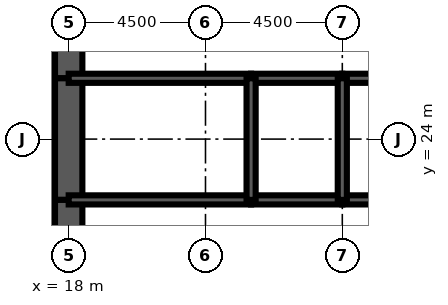
"""IFC4 building model, lengths in metres.
Left out: names, types, materials, properties, quantities, classifications, styles, units other than length and angle.
Written with IfcOpenShell. Run it as: python <this file> out.ifc"""

import sys

from ifc_helpers import new_model, si_unit, direction, frame, frame_2d, origin, place, context, subcontext, project, spatial, rectangle, extrude, element, fill, save


model = new_model("IFC4")
c1 = context("Model", 3, precision=1e-05, world=origin(), true_north=direction((0.0, 1.0)))
c2 = subcontext(c1, "Body", "Model", "MODEL_VIEW")
j1 = project(units=[si_unit("LENGTHUNIT", "METRE"), si_unit("PLANEANGLEUNIT", "RADIAN")], contexts=[c1])
p1 = place(None, origin())
s1 = spatial("IfcSite", under=j1, at=p1, CompositionType="ELEMENT")
p2 = place(p1, origin())
s2 = spatial("IfcBuilding", under=s1, at=p2, CompositionType="ELEMENT")
p3 = place(p2, frame((0.0, 0.0, 163.5)))
s3 = spatial("IfcBuildingStorey", under=s2, at=p3, CompositionType="ELEMENT", Elevation=163.5)
p4 = place(p3, frame((18.0, 28.8, 0.0), z_axis=(0.0, 0.0, 1.0), x_axis=(0.0, -1.0, 0.0)))
e1 = element("IfcWall", 1, at=p4, inside=s3, PredefinedType="SHEAR", context=c2, shape_type="SweptSolid", body=[
    extrude(rectangle(XDim=2.8, YDim=0.9, at=frame_2d((1.4, 0.0))), origin(), (0.0, 0.0, 1.0), 4.2),
])
p5 = place(p4, frame((0.4, 0.0, 0.0)))
e2 = element("IfcOpeningElement", 2, at=p5, cuts=e1, PredefinedType="OPENING", context=c2, shape_type="SweptSolid", body=[
    extrude(rectangle(XDim=1.8, YDim=2.1, at=frame_2d((0.9, 1.05))), frame((0.0, 0.46, 0.0), z_axis=(0.0, -1.0, 0.0), x_axis=(1.0, 0.0, 0.0)), (0.0, 0.0, 1.0), 0.92),
])
p6 = place(p3, frame((18.0, 26.0, 0.0), z_axis=(0.0, 0.0, 1.0), x_axis=(0.0, -1.0, 0.0)))
e3 = element("IfcWall", 3, at=p6, inside=s3, PredefinedType="SHEAR", context=c2, shape_type="SweptSolid", body=[
    extrude(rectangle(XDim=4.0, YDim=0.9, at=frame_2d((2.0, 0.0))), origin(), (0.0, 0.0, 1.0), 4.2),
])
p7 = place(p3, frame((18.0, 22.0, 0.0), z_axis=(0.0, 0.0, 1.0), x_axis=(0.0, -1.0, 0.0)))
e4 = element("IfcWall", 4, at=p7, inside=s3, PredefinedType="SHEAR", context=c2, shape_type="SweptSolid", body=[
    extrude(rectangle(XDim=2.8, YDim=0.9, at=frame_2d((1.4, 0.0))), origin(), (0.0, 0.0, 1.0), 4.2),
])
p8 = place(p7, frame((0.6, 0.0, 0.0)))
e5 = element("IfcOpeningElement", 5, at=p8, cuts=e4, PredefinedType="OPENING", context=c2, shape_type="SweptSolid", body=[
    extrude(rectangle(XDim=1.8, YDim=2.1, at=frame_2d((0.9, 1.05))), frame((0.0, 0.46, 0.0), z_axis=(0.0, -1.0, 0.0), x_axis=(1.0, 0.0, 0.0)), (0.0, 0.0, 1.0), 0.92),
])
p9 = place(p3, frame((18.0, 22.0, 0.0), z_axis=(0.0, 0.0, 1.0), x_axis=(1.0, 0.0, 0.0)))
e6 = element("IfcWall", 6, at=p9, inside=s3, PredefinedType="SOLIDWALL", context=c2, shape_type="SweptSolid", body=[
    extrude(rectangle(XDim=6.0, YDim=0.3, at=frame_2d((3.0, 0.0))), origin(), (0.0, 0.0, 1.0), 4.2),
])
p10 = place(p9, frame((4.4, 0.0, 0.0)))
e7 = element("IfcOpeningElement", 7, at=p10, cuts=e6, PredefinedType="OPENING", context=c2, shape_type="SweptSolid", body=[
    extrude(rectangle(XDim=1.0, YDim=2.1, at=frame_2d((0.5, 1.05))), frame((0.0, 0.16, 0.0), z_axis=(0.0, -1.0, 0.0), x_axis=(1.0, 0.0, 0.0)), (0.0, 0.0, 1.0), 0.32),
])
p11 = place(p9, frame((0.85, 0.0, 0.0)))
e8 = element("IfcOpeningElement", 8, at=p11, cuts=e6, PredefinedType="OPENING", context=c2, shape_type="SweptSolid", body=[
    extrude(rectangle(XDim=1.0, YDim=2.1, at=frame_2d((0.5, 1.05))), frame((0.0, 0.16, 0.0), z_axis=(0.0, -1.0, 0.0), x_axis=(1.0, 0.0, 0.0)), (0.0, 0.0, 1.0), 0.32),
])
p12 = place(p3, frame((24.0, 22.0, 0.0), z_axis=(0.0, 0.0, 1.0), x_axis=(1.0, 0.0, 0.0)))
e9 = element("IfcWall", 9, at=p12, inside=s3, PredefinedType="SOLIDWALL", context=c2, shape_type="SweptSolid", body=[
    extrude(rectangle(XDim=3.0, YDim=0.3, at=frame_2d((1.5, 0.0))), origin(), (0.0, 0.0, 1.0), 4.2),
])
p13 = place(p12, frame((1.0, 0.0, 0.0)))
e10 = element("IfcOpeningElement", 10, at=p13, cuts=e9, PredefinedType="OPENING", context=c2, shape_type="SweptSolid", body=[
    extrude(rectangle(XDim=1.0, YDim=2.1, at=frame_2d((0.5, 1.05))), frame((0.0, 0.16, 0.0), z_axis=(0.0, -1.0, 0.0), x_axis=(1.0, 0.0, 0.0)), (0.0, 0.0, 1.0), 0.32),
])
p14 = place(p3, frame((27.0, 22.0, 0.0), z_axis=(0.0, 0.0, 1.0), x_axis=(1.0, 0.0, 0.0)))
e11 = element("IfcWall", 11, at=p14, inside=s3, PredefinedType="SOLIDWALL", context=c2, shape_type="SweptSolid", body=[
    extrude(rectangle(XDim=9.0, YDim=0.3, at=frame_2d((4.5, 0.0))), origin(), (0.0, 0.0, 1.0), 4.2),
])
p15 = place(p14, frame((4.0, 0.0, 0.0)))
e12 = element("IfcOpeningElement", 12, at=p15, cuts=e11, PredefinedType="OPENING", context=c2, shape_type="SweptSolid", body=[
    extrude(rectangle(XDim=1.0, YDim=2.1, at=frame_2d((0.5, 1.05))), frame((0.0, 0.16, 0.0), z_axis=(0.0, -1.0, 0.0), x_axis=(1.0, 0.0, 0.0)), (0.0, 0.0, 1.0), 0.32),
])
p16 = place(p3, frame((18.0, 26.0, 0.0), z_axis=(0.0, 0.0, 1.0), x_axis=(1.0, 0.0, 0.0)))
e13 = element("IfcWall", 13, at=p16, inside=s3, PredefinedType="SOLIDWALL", context=c2, shape_type="SweptSolid", body=[
    extrude(rectangle(XDim=6.0, YDim=0.3, at=frame_2d((3.0, 0.0))), origin(), (0.0, 0.0, 1.0), 4.2),
])
p17 = place(p3, frame((24.0, 26.0, 0.0), z_axis=(0.0, 0.0, 1.0), x_axis=(1.0, 0.0, 0.0)))
e14 = element("IfcWall", 14, at=p17, inside=s3, PredefinedType="SOLIDWALL", context=c2, shape_type="SweptSolid", body=[
    extrude(rectangle(XDim=3.0, YDim=0.3, at=frame_2d((1.5, 0.0))), origin(), (0.0, 0.0, 1.0), 4.2),
])
p18 = place(p3, frame((27.0, 26.0, 0.0), z_axis=(0.0, 0.0, 1.0), x_axis=(1.0, 0.0, 0.0)))
e15 = element("IfcWall", 15, at=p18, inside=s3, PredefinedType="SOLIDWALL", context=c2, shape_type="SweptSolid", body=[
    extrude(rectangle(XDim=9.0, YDim=0.3, at=frame_2d((4.5, 0.0))), origin(), (0.0, 0.0, 1.0), 4.2),
])
for number, where, z_axis, x_axis in (
    (16, (24.0, 22.0, 0.0), (0.0, 0.0, 1.0), (0.0, 1.0, 0.0)),
    (17, (27.0, 22.0, 0.0), (0.0, 0.0, 1.0), (0.0, 1.0, 0.0)),
):
    element("IfcWall", number, at=place(p3, frame(where, z_axis=z_axis, x_axis=x_axis)), inside=s3, PredefinedType="SOLIDWALL", context=c2, shape_type="SweptSolid", body=[
        extrude(rectangle(XDim=4.0, YDim=0.3, at=frame_2d((2.0, 0.0))), origin(), (0.0, 0.0, 1.0), 4.2),
    ])
p19 = place(p3, frame((20.325, 22.15, 0.0), z_axis=(0.0, 0.0, 1.0), x_axis=(0.0, 1.0, 0.0)))
e18 = element("IfcWall", 18, at=p19, inside=s3, PredefinedType="PARTITIONING", context=c2, shape_type="SweptSolid", body=[
    extrude(rectangle(XDim=3.7, YDim=0.15, at=frame_2d((1.85, 0.0))), origin(), (0.0, 0.0, 1.0), 3.0),
])
p20 = place(p8, origin())
e19 = element("IfcDoor", 19, at=p20, inside=s3, OperationType="SINGLE_SWING_LEFT", PredefinedType="DOOR", context=c2, shape_type="SweptSolid", body=[
    extrude(rectangle(XDim=1.8, YDim=2.1, at=frame_2d((0.9, 1.05))), frame((0.0, 0.45, 0.0), z_axis=(0.0, -1.0, 0.0), x_axis=(1.0, 0.0, 0.0)), (0.0, 0.0, 1.0), 0.899),
])
fill(e5, e19)
p21 = place(p5, origin())
e20 = element("IfcDoor", 20, at=p21, inside=s3, OperationType="SINGLE_SWING_LEFT", PredefinedType="DOOR", context=c2, shape_type="SweptSolid", body=[
    extrude(rectangle(XDim=1.8, YDim=2.1, at=frame_2d((0.9, 1.05))), frame((0.0, 0.45, 0.0), z_axis=(0.0, -1.0, 0.0), x_axis=(1.0, 0.0, 0.0)), (0.0, 0.0, 1.0), 0.899),
])
fill(e2, e20)
p22 = place(p10, origin())
e21 = element("IfcDoor", 21, at=p22, inside=s3, OperationType="SINGLE_SWING_RIGHT", PredefinedType="DOOR", context=c2, shape_type="SweptSolid", body=[
    extrude(rectangle(XDim=1.0, YDim=2.1, at=frame_2d((0.5, 1.05))), frame((0.0, 0.025, 0.0), z_axis=(0.0, -1.0, 0.0), x_axis=(1.0, 0.0, 0.0)), (0.0, 0.0, 1.0), 0.05),
])
fill(e7, e21)
p23 = place(p13, origin())
e22 = element("IfcDoor", 22, at=p23, inside=s3, OperationType="SINGLE_SWING_LEFT", PredefinedType="DOOR", context=c2, shape_type="SweptSolid", body=[
    extrude(rectangle(XDim=1.0, YDim=2.1, at=frame_2d((0.5, 1.05))), frame((0.0, 0.025, 0.0), z_axis=(0.0, -1.0, 0.0), x_axis=(1.0, 0.0, 0.0)), (0.0, 0.0, 1.0), 0.05),
])
fill(e10, e22)
p24 = place(p11, origin())
e23 = element("IfcDoor", 23, at=p24, inside=s3, OperationType="SINGLE_SWING_LEFT", PredefinedType="DOOR", context=c2, shape_type="SweptSolid", body=[
    extrude(rectangle(XDim=1.0, YDim=2.1, at=frame_2d((0.5, 1.05))), frame((0.0, 0.025, 0.0), z_axis=(0.0, -1.0, 0.0), x_axis=(1.0, 0.0, 0.0)), (0.0, 0.0, 1.0), 0.05),
])
fill(e8, e23)
save(model, sys.argv[1])
